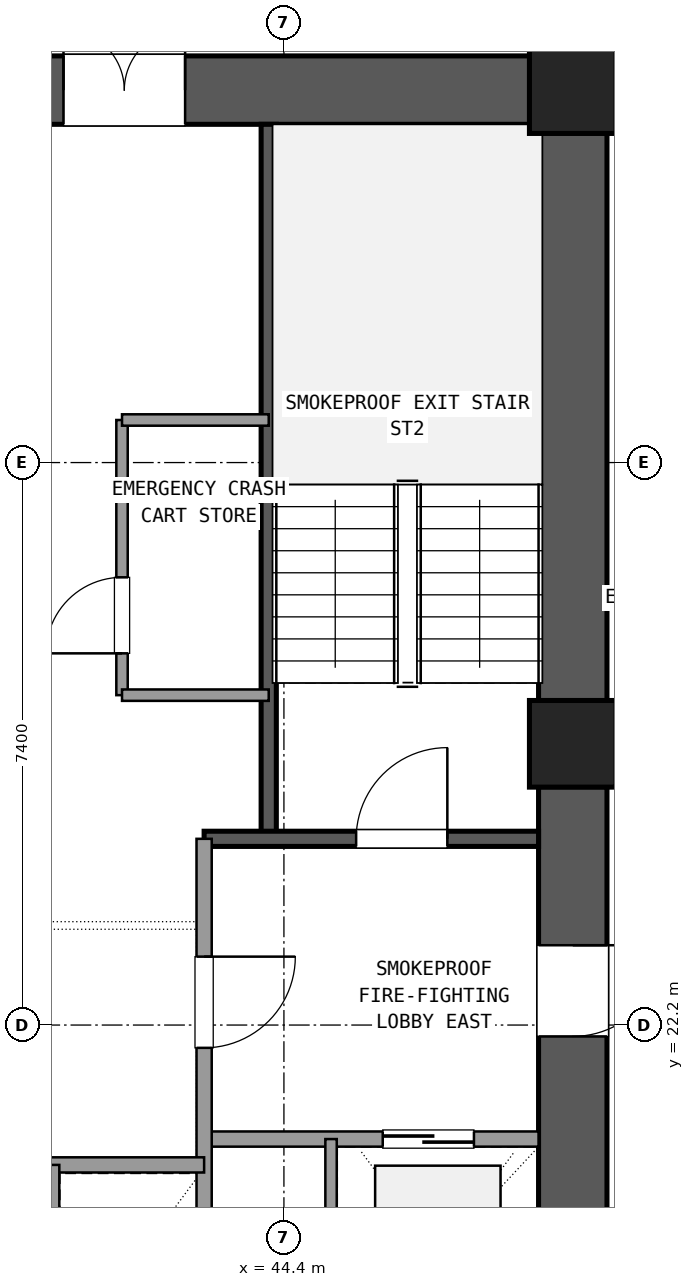
"""IFC4 building model, lengths in metres.
Left out: names, types, materials, properties, quantities, classifications, styles, units other than length and angle.
Written with IfcOpenShell. Run it as: python <this file> out.ifc"""

import sys

from ifc_helpers import new_model, si_unit, direction, frame, frame_2d, origin, origin_2d, place, context, subcontext, project, spatial, rectangle, extrude, element, fill, save


model = new_model("IFC4")
c1 = context("Model", 3, precision=1e-05, world=origin(), true_north=direction((0.0, 1.0)))
c2 = subcontext(c1, "Body", "Model", "MODEL_VIEW")
j1 = project(units=[si_unit("LENGTHUNIT", "METRE"), si_unit("PLANEANGLEUNIT", "RADIAN")], contexts=[c1])
p1 = place(None, origin())
s1 = spatial("IfcSite", under=j1, at=p1, CompositionType="ELEMENT")
p2 = place(p1, origin())
s2 = spatial("IfcBuilding", under=s1, at=p2, CompositionType="ELEMENT")
p3 = place(p2, frame((0.0, 0.0, 27.54)))
s3 = spatial("IfcBuildingStorey", under=s2, at=p3, CompositionType="ELEMENT", Elevation=27.54)
for number, where, z_axis, x_axis in (
    (1, (48.2, 25.9, 0.0), (0.0, 0.0, 1.0), (1.0, 0.0, 0.0)),
    (2, (48.2, 34.5, 0.0), (0.0, 0.0, 1.0), (1.0, 0.0, 0.0)),
):
    element("IfcColumn", number, at=place(p3, frame(where, z_axis=z_axis, x_axis=x_axis)), inside=s3, PredefinedType="COLUMN", context=c2, shape_type="SweptSolid", body=[
        extrude(rectangle(XDim=1.14, YDim=1.14, at=origin_2d()), origin(), (0.0, 0.0, 1.0), 3.6),
    ])
p4 = place(p3, frame((48.2, 17.865, 0.0), z_axis=(0.0, 0.0, 1.0), x_axis=(0.0, 1.0, 0.0)))
e3 = element("IfcWall", 3, at=p4, inside=s3, PredefinedType="SHEAR", context=c2, shape_type="SweptSolid", body=[
    extrude(rectangle(XDim=7.47, YDim=0.9, at=frame_2d((3.735, 0.0))), origin(), (0.0, 0.0, 1.0), 3.32),
])
p5 = place(p4, frame((4.185, 0.0, 0.0)))
e4 = element("IfcOpeningElement", 4, at=p5, cuts=e3, PredefinedType="OPENING", context=c2, shape_type="SweptSolid", body=[
    extrude(rectangle(XDim=1.2, YDim=2.15, at=frame_2d((0.6, 1.075))), frame((0.0, 0.46, 0.0), z_axis=(0.0, -1.0, 0.0), x_axis=(1.0, 0.0, 0.0)), (0.0, 0.0, 1.0), 0.92),
])
p6 = place(p3, frame((48.2, 26.465, 0.0), z_axis=(0.0, 0.0, 1.0), x_axis=(0.0, 1.0, 0.0)))
e5 = element("IfcWall", 5, at=p6, inside=s3, PredefinedType="SHEAR", context=c2, shape_type="SweptSolid", body=[
    extrude(rectangle(XDim=7.47, YDim=0.9, at=frame_2d((3.735, 0.0))), origin(), (0.0, 0.0, 1.0), 3.32),
])
p7 = place(p3, frame((47.635, 34.5, 0.0), z_axis=(0.0, 0.0, 1.0), x_axis=(-1.0, 0.0, 0.0)))
e6 = element("IfcWall", 6, at=p7, inside=s3, PredefinedType="SHEAR", context=c2, shape_type="SweptSolid", body=[
    extrude(rectangle(XDim=10.07, YDim=0.9, at=frame_2d((5.035, 0.0))), origin(), (0.0, 0.0, 1.0), 3.32),
])
p8 = place(p7, frame((4.535, 0.0, 0.0)))
e7 = element("IfcOpeningElement", 7, at=p8, cuts=e6, PredefinedType="OPENING", context=c2, shape_type="SweptSolid", body=[
    extrude(rectangle(XDim=1.6, YDim=2.2, at=frame_2d((0.8, 1.1))), frame((0.0, 0.46, 0.0), z_axis=(0.0, -1.0, 0.0), x_axis=(1.0, 0.0, 0.0)), (0.0, 0.0, 1.0), 0.92),
])
p9 = place(p3, frame((44.2, 24.65, 0.0), z_axis=(0.0, 0.0, 1.0), x_axis=(0.0, 1.0, 0.0)))
e8 = element("IfcWall", 8, at=p9, inside=s3, PredefinedType="SHEAR", context=c2, shape_type="SweptSolid", body=[
    extrude(rectangle(XDim=9.4, YDim=0.2, at=frame_2d((4.7, 0.0))), origin(), (0.0, 0.0, 1.0), 3.32),
])
p10 = place(p3, frame((43.35, 24.65, 0.0), z_axis=(0.0, 0.0, 1.0), x_axis=(1.0, 0.0, 0.0)))
e9 = element("IfcWall", 9, at=p10, inside=s3, PredefinedType="SHEAR", context=c2, shape_type="SweptSolid", body=[
    extrude(rectangle(XDim=4.4, YDim=0.2, at=frame_2d((2.2, 0.0))), origin(), (0.0, 0.0, 1.0), 3.32),
])
p11 = place(p10, frame((2.0, 0.0, 0.0)))
e10 = element("IfcOpeningElement", 10, at=p11, cuts=e9, PredefinedType="OPENING", context=c2, shape_type="SweptSolid", body=[
    extrude(rectangle(XDim=1.2, YDim=2.15, at=frame_2d((0.6, 1.075))), frame((0.0, 0.11, 0.0), z_axis=(0.0, -1.0, 0.0), x_axis=(1.0, 0.0, 0.0)), (0.0, 0.0, 1.0), 0.22),
])
p12 = place(p3, frame((43.35, 20.7, 0.0), z_axis=(0.0, 0.0, 1.0), x_axis=(1.0, 0.0, 0.0)))
e11 = element("IfcWall", 11, at=p12, inside=s3, PredefinedType="SOLIDWALL", context=c2, shape_type="SweptSolid", body=[
    extrude(rectangle(XDim=4.4, YDim=0.2, at=frame_2d((2.2, 0.0))), origin(), (0.0, 0.0, 1.0), 2.61),
])
p13 = place(p12, frame((2.35, 0.0, 0.0)))
e12 = element("IfcOpeningElement", 12, at=p13, cuts=e11, PredefinedType="OPENING", context=c2, shape_type="SweptSolid", body=[
    extrude(rectangle(XDim=1.2, YDim=2.15, at=frame_2d((0.6, 1.075))), frame((0.0, 0.11, 0.0), z_axis=(0.0, -1.0, 0.0), x_axis=(1.0, 0.0, 0.0)), (0.0, 0.0, 1.0), 0.22),
])
p14 = place(p3, frame((43.35, 17.75, 0.0), z_axis=(0.0, 0.0, 1.0), x_axis=(0.0, 1.0, 0.0)))
e13 = element("IfcWall", 13, at=p14, inside=s3, PredefinedType="SOLIDWALL", context=c2, shape_type="SweptSolid", body=[
    extrude(rectangle(XDim=6.9, YDim=0.2, at=frame_2d((3.45, 0.0))), origin(), (0.0, 0.0, 1.0), 2.61),
])
p15 = place(p14, frame((4.15, 0.0, 0.0)))
e14 = element("IfcOpeningElement", 14, at=p15, cuts=e13, PredefinedType="OPENING", context=c2, shape_type="SweptSolid", body=[
    extrude(rectangle(XDim=1.2, YDim=2.15, at=frame_2d((0.6, 1.075))), frame((0.0, 0.11, 0.0), z_axis=(0.0, -1.0, 0.0), x_axis=(1.0, 0.0, 0.0)), (0.0, 0.0, 1.0), 0.22),
])
p16 = place(p3, frame((45.02, 17.75, 0.0), z_axis=(0.0, 0.0, 1.0), x_axis=(0.0, 1.0, 0.0)))
e15 = element("IfcWall", 15, at=p16, inside=s3, PredefinedType="PARTITIONING", context=c2, shape_type="SweptSolid", body=[
    extrude(rectangle(XDim=2.95, YDim=0.15, at=frame_2d((1.475, 0.0))), origin(), (0.0, 0.0, 1.0), 2.61),
])
p17 = place(p3, frame((37.25, 20.36, 0.0), z_axis=(0.0, 0.0, 1.0), x_axis=(1.0, 0.0, 0.0)))
e16 = element("IfcWall", 16, at=p17, inside=s3, PredefinedType="SOLIDWALL", context=c2, shape_type="SweptSolid", body=[
    extrude(rectangle(XDim=6.1, YDim=0.2, at=frame_2d((3.05, 0.0))), origin(), (0.0, 0.0, 1.0), 2.61),
])
p18 = place(p3, frame((41.37, 17.75, 0.0), z_axis=(0.0, 0.0, 1.0), x_axis=(0.0, 1.0, 0.0)))
e17 = element("IfcWall", 17, at=p18, inside=s3, PredefinedType="PARTITIONING", context=c2, shape_type="SweptSolid", body=[
    extrude(rectangle(XDim=2.61, YDim=0.15, at=frame_2d((1.305, 0.0))), origin(), (0.0, 0.0, 1.0), 2.61),
])
p19 = place(p3, frame((42.27, 26.54, 0.0), z_axis=(0.0, 0.0, 1.0), x_axis=(0.0, 1.0, 0.0)))
e18 = element("IfcWall", 18, at=p19, inside=s3, PredefinedType="PARTITIONING", context=c2, shape_type="SweptSolid", body=[
    extrude(rectangle(XDim=3.62, YDim=0.15, at=frame_2d((1.81, 0.0))), origin(), (0.0, 0.0, 1.0), 2.61),
])
p20 = place(p19, frame((0.55, 0.0, 0.0)))
e19 = element("IfcOpeningElement", 19, at=p20, cuts=e18, PredefinedType="OPENING", context=c2, shape_type="SweptSolid", body=[
    extrude(rectangle(XDim=1.0, YDim=2.15, at=frame_2d((0.5, 1.075))), frame((0.0, 0.085, 0.0), z_axis=(0.0, -1.0, 0.0), x_axis=(1.0, 0.0, 0.0)), (0.0, 0.0, 1.0), 0.17),
])
for number, where, z_axis, x_axis in (
    (20, (42.27, 26.54, 0.0), (0.0, 0.0, 1.0), (1.0, 0.0, 0.0)),
    (21, (42.27, 30.16, 0.0), (0.0, 0.0, 1.0), (1.0, 0.0, 0.0)),
):
    element("IfcWall", number, at=place(p3, frame(where, z_axis=z_axis, x_axis=x_axis)), inside=s3, PredefinedType="PARTITIONING", context=c2, shape_type="SweptSolid", body=[
        extrude(rectangle(XDim=1.93, YDim=0.15, at=frame_2d((0.965, 0.0))), origin(), (0.0, 0.0, 1.0), 2.61),
    ])
p21 = place(p11, origin())
e22 = element("IfcDoor", 22, at=p21, inside=s3, OperationType="SINGLE_SWING_RIGHT", PredefinedType="DOOR", context=c2, shape_type="SweptSolid", body=[
    extrude(rectangle(XDim=1.2, YDim=2.15, at=frame_2d((0.6, 1.075))), frame((0.0, 0.025, 0.0), z_axis=(0.0, -1.0, 0.0), x_axis=(1.0, 0.0, 0.0)), (0.0, 0.0, 1.0), 0.05),
])
fill(e10, e22)
p22 = place(p13, origin())
e23 = element("IfcDoor", 23, at=p22, inside=s3, OperationType="SLIDING_TO_RIGHT", PredefinedType="DOOR", context=c2, shape_type="SweptSolid", body=[
    extrude(rectangle(XDim=1.2, YDim=2.15, at=frame_2d((0.6, 1.075))), frame((0.0, 0.025, 0.0), z_axis=(0.0, -1.0, 0.0), x_axis=(1.0, 0.0, 0.0)), (0.0, 0.0, 1.0), 0.05),
])
fill(e12, e23)
p23 = place(p15, frame((1.2, 0.0, 0.0), z_axis=(0.0, 0.0, 1.0), x_axis=(-1.0, 0.0, 0.0)))
e24 = element("IfcDoor", 24, at=p23, inside=s3, OperationType="SINGLE_SWING_RIGHT", PredefinedType="DOOR", context=c2, shape_type="SweptSolid", body=[
    extrude(rectangle(XDim=1.2, YDim=2.15, at=frame_2d((0.6, 1.075))), frame((0.0, 0.025, 0.0), z_axis=(0.0, -1.0, 0.0), x_axis=(1.0, 0.0, 0.0)), (0.0, 0.0, 1.0), 0.05),
])
fill(e14, e24)
p24 = place(p5, frame((1.2, 0.0, 0.0), z_axis=(0.0, 0.0, 1.0), x_axis=(-1.0, 0.0, 0.0)))
e25 = element("IfcDoor", 25, at=p24, inside=s3, OperationType="SINGLE_SWING_RIGHT", PredefinedType="DOOR", context=c2, shape_type="SweptSolid", body=[
    extrude(rectangle(XDim=1.2, YDim=2.15, at=frame_2d((0.6, 1.075))), frame((0.0, 0.025, 0.0), z_axis=(0.0, -1.0, 0.0), x_axis=(1.0, 0.0, 0.0)), (0.0, 0.0, 1.0), 0.05),
])
fill(e4, e25)
p25 = place(p8, frame((1.6, 0.0, 0.0), z_axis=(0.0, 0.0, 1.0), x_axis=(-1.0, 0.0, 0.0)))
e26 = element("IfcDoor", 26, at=p25, inside=s3, OperationType="DOUBLE_DOOR_SINGLE_SWING", PredefinedType="DOOR", context=c2, shape_type="SweptSolid", body=[
    extrude(rectangle(XDim=1.6, YDim=2.2, at=frame_2d((0.8, 1.1))), frame((0.0, 0.025, 0.0), z_axis=(0.0, -1.0, 0.0), x_axis=(1.0, 0.0, 0.0)), (0.0, 0.0, 1.0), 0.05),
])
fill(e7, e26)
p26 = place(p20, origin())
e27 = element("IfcDoor", 27, at=p26, inside=s3, OperationType="SINGLE_SWING_LEFT", PredefinedType="DOOR", context=c2, shape_type="SweptSolid", body=[
    extrude(rectangle(XDim=1.0, YDim=2.15, at=frame_2d((0.5, 1.075))), frame((0.0, 0.025, 0.0), z_axis=(0.0, -1.0, 0.0), x_axis=(1.0, 0.0, 0.0)), (0.0, 0.0, 1.0), 0.05),
])
fill(e19, e27)
save(model, sys.argv[1])
